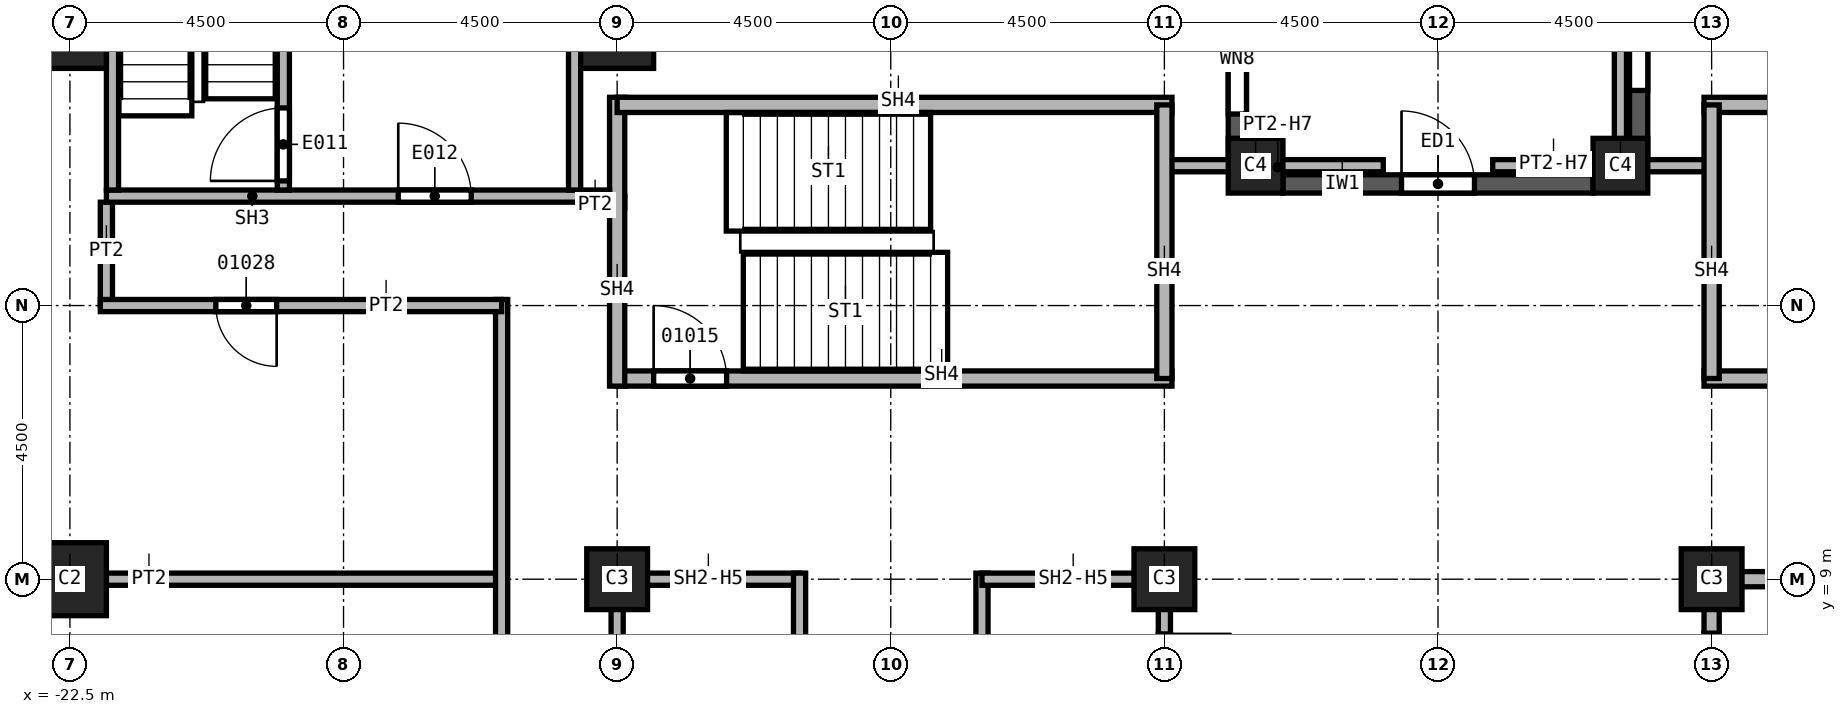
"""IFC4 building model, lengths in metres.
Left out: names, types, materials, properties, quantities, classifications, styles, units other than length and angle.
Written with IfcOpenShell. Run it as: python <this file> out.ifc"""

import sys

from ifc_helpers import new_model, si_unit, direction, frame, frame_2d, origin, origin_2d, place, context, subcontext, project, spatial, rectangle, extrude, element, fill, save


model = new_model("IFC4")
c1 = context("Model", 3, precision=1e-05, world=origin(), true_north=direction((0.0, 1.0)))
c2 = subcontext(c1, "Body", "Model", "MODEL_VIEW")
j1 = project(units=[si_unit("LENGTHUNIT", "METRE"), si_unit("PLANEANGLEUNIT", "RADIAN")], contexts=[c1])
p1 = place(None, origin())
s1 = spatial("IfcSite", under=j1, at=p1, CompositionType="ELEMENT")
p2 = place(p1, origin())
s2 = spatial("IfcBuilding", under=s1, at=p2, CompositionType="ELEMENT")
p3 = place(p2, frame((0.0, 0.0, 68.0)))
s3 = spatial("IfcBuildingStorey", under=s2, at=p3, CompositionType="ELEMENT", Elevation=68.0)
for number, where, z_axis, x_axis in (
    (1, (-13.5, 18.0, 0.0), (0.0, 0.0, 1.0), (1.0, 0.0, 0.0)),
    (2, (-22.5, 9.0, 0.0), (0.0, 0.0, 1.0), (1.0, 0.0, 0.0)),
    (3, (-22.5, 18.0, 0.0), (0.0, 0.0, 1.0), (1.0, 0.0, 0.0)),
):
    element("IfcColumn", number, at=place(p3, frame(where, z_axis=z_axis, x_axis=x_axis)), inside=s3, PredefinedType="COLUMN", context=c2, shape_type="SweptSolid", body=[
        extrude(rectangle(XDim=1.2, YDim=1.2, at=origin_2d()), origin(), (0.0, 0.0, 1.0), 3.7),
    ])
for number, where, z_axis, x_axis in (
    (4, (4.5, 9.0, 0.0), (0.0, 0.0, 1.0), (1.0, 0.0, 0.0)),
    (5, (-4.5, 9.0, 0.0), (0.0, 0.0, 1.0), (1.0, 0.0, 0.0)),
    (6, (-13.5, 9.0, 0.0), (0.0, 0.0, 1.0), (1.0, 0.0, 0.0)),
):
    element("IfcColumn", number, at=place(p3, frame(where, z_axis=z_axis, x_axis=x_axis)), inside=s3, PredefinedType="COLUMN", context=c2, shape_type="SweptSolid", body=[
        extrude(rectangle(XDim=1.0, YDim=1.0, at=origin_2d()), origin(), (0.0, 0.0, 1.0), 3.7),
    ])
for number, where, z_axis, x_axis in (
    (7, (3.0, 15.8, 0.0), (0.0, 0.0, 1.0), (1.0, 0.0, 0.0)),
    (8, (-3.0, 15.8, 0.0), (0.0, 0.0, 1.0), (1.0, 0.0, 0.0)),
):
    element("IfcColumn", number, at=place(p3, frame(where, z_axis=z_axis, x_axis=x_axis)), inside=s3, PredefinedType="COLUMN", context=c2, shape_type="SweptSolid", body=[
        extrude(rectangle(XDim=0.9, YDim=0.9, at=origin_2d()), origin(), (0.0, 0.0, 1.0), 3.7),
    ])
p4 = place(p3, frame((3.3, 24.2, 0.0), z_axis=(0.0, 0.0, 1.0), x_axis=(0.0, -1.0, 0.0)))
e9 = element("IfcWall", 9, at=p4, inside=s3, PredefinedType="SOLIDWALL", context=c2, shape_type="SweptSolid", body=[
    extrude(rectangle(XDim=8.35, YDim=0.3, at=frame_2d((4.175, 0.0))), origin(), (0.0, 0.0, 1.0), 3.1),
])
p5 = place(p4, frame((0.788, 0.0, 0.8)))
e10 = element("IfcOpeningElement", 10, at=p5, cuts=e9, PredefinedType="OPENING", context=c2, shape_type="SweptSolid", body=[
    extrude(rectangle(XDim=2.4, YDim=1.95, at=frame_2d((1.2, 0.975))), frame((0.0, 0.15, 0.0), z_axis=(0.0, -1.0, 0.0), x_axis=(1.0, 0.0, 0.0)), (0.0, 0.0, 1.0), 0.3),
])
p6 = place(p4, frame((4.762, 0.0, 0.8)))
e11 = element("IfcOpeningElement", 11, at=p6, cuts=e9, PredefinedType="OPENING", context=c2, shape_type="SweptSolid", body=[
    extrude(rectangle(XDim=2.4, YDim=1.95, at=frame_2d((1.2, 0.975))), frame((0.0, 0.15, 0.0), z_axis=(0.0, -1.0, 0.0), x_axis=(1.0, 0.0, 0.0)), (0.0, 0.0, 1.0), 0.3),
])
p7 = place(p3, frame((-2.55, 15.5, 0.0), z_axis=(0.0, 0.0, 1.0), x_axis=(1.0, 0.0, 0.0)))
e12 = element("IfcWall", 12, at=p7, inside=s3, PredefinedType="SOLIDWALL", context=c2, shape_type="SweptSolid", body=[
    extrude(rectangle(XDim=5.1, YDim=0.3, at=frame_2d((2.55, 0.0))), origin(), (0.0, 0.0, 1.0), 3.1),
])
p8 = place(p7, frame((1.95, 0.0, 0.0)))
e13 = element("IfcOpeningElement", 13, at=p8, cuts=e12, PredefinedType="OPENING", context=c2, shape_type="SweptSolid", body=[
    extrude(rectangle(XDim=1.2, YDim=2.4, at=frame_2d((0.6, 1.2))), frame((0.0, 0.15, 0.0), z_axis=(0.0, -1.0, 0.0), x_axis=(1.0, 0.0, 0.0)), (0.0, 0.0, 1.0), 0.3),
])
p9 = place(p3, frame((-3.3, 15.85, 0.0), z_axis=(0.0, 0.0, 1.0), x_axis=(0.0, 1.0, 0.0)))
e14 = element("IfcWall", 14, at=p9, inside=s3, PredefinedType="SOLIDWALL", context=c2, shape_type="SweptSolid", body=[
    extrude(rectangle(XDim=8.35, YDim=0.3, at=frame_2d((4.175, 0.0))), origin(), (0.0, 0.0, 1.0), 3.1),
])
p10 = place(p9, frame((4.363, 0.0, 0.8)))
e15 = element("IfcOpeningElement", 15, at=p10, cuts=e14, PredefinedType="OPENING", context=c2, shape_type="SweptSolid", body=[
    extrude(rectangle(XDim=2.4, YDim=1.95, at=frame_2d((1.2, 0.975))), frame((0.0, 0.15, 0.0), z_axis=(0.0, -1.0, 0.0), x_axis=(1.0, 0.0, 0.0)), (0.0, 0.0, 1.0), 0.3),
])
p11 = place(p9, frame((0.8, 0.0, 0.8)))
e16 = element("IfcOpeningElement", 16, at=p11, cuts=e14, PredefinedType="OPENING", context=c2, shape_type="SweptSolid", body=[
    extrude(rectangle(XDim=1.8, YDim=1.95, at=frame_2d((0.9, 0.975))), frame((0.0, 0.15, 0.0), z_axis=(0.0, -1.0, 0.0), x_axis=(1.0, 0.0, 0.0)), (0.0, 0.0, 1.0), 0.3),
])
p12 = place(p3, frame((-27.1, 9.0, 0.0), z_axis=(0.0, 0.0, 1.0), x_axis=(1.0, 0.0, 0.0)))
e17 = element("IfcWall", 17, at=p12, inside=s3, PredefinedType="PARTITIONING", context=c2, shape_type="SweptSolid", body=[
    extrude(rectangle(XDim=11.7, YDim=0.2, at=frame_2d((5.85, 0.0))), origin(), (0.0, 0.0, 1.0), 3.7),
])
p13 = place(p3, frame((-21.9, 13.5, 0.0), z_axis=(0.0, 0.0, 1.0), x_axis=(0.0, 1.0, 0.0)))
e18 = element("IfcWall", 18, at=p13, inside=s3, PredefinedType="PARTITIONING", context=c2, shape_type="SweptSolid", body=[
    extrude(rectangle(XDim=1.7, YDim=0.2, at=frame_2d((0.85, 0.0))), origin(), (0.0, 0.0, 1.0), 3.7),
])
p14 = place(p3, frame((-15.4, 3.65, 0.0), z_axis=(0.0, 0.0, 1.0), x_axis=(0.0, 1.0, 0.0)))
e19 = element("IfcWall", 19, at=p14, inside=s3, PredefinedType="PARTITIONING", context=c2, shape_type="SweptSolid", body=[
    extrude(rectangle(XDim=9.95, YDim=0.2, at=frame_2d((4.975, 0.0))), origin(), (0.0, 0.0, 1.0), 3.7),
])
p15 = place(p3, frame((-15.4, 13.5, 0.0), z_axis=(0.0, 0.0, 1.0), x_axis=(-1.0, 0.0, 0.0)))
e20 = element("IfcWall", 20, at=p15, inside=s3, PredefinedType="PARTITIONING", context=c2, shape_type="SweptSolid", body=[
    extrude(rectangle(XDim=6.6, YDim=0.2, at=frame_2d((3.3, 0.0))), origin(), (0.0, 0.0, 1.0), 3.7),
])
p16 = place(p15, frame((3.7, 0.0, 0.0)))
e21 = element("IfcOpeningElement", 21, at=p16, cuts=e20, PredefinedType="OPENING", context=c2, shape_type="SweptSolid", body=[
    extrude(rectangle(XDim=1.0, YDim=2.1, at=frame_2d((0.5, 1.05))), frame((0.0, 0.1, 0.0), z_axis=(0.0, -1.0, 0.0), x_axis=(1.0, 0.0, 0.0)), (0.0, 0.0, 1.0), 0.2),
])
p17 = place(p3, frame((-14.1, 15.2, 0.0), z_axis=(0.0, 0.0, 1.0), x_axis=(1.0, 0.0, 0.0)))
e22 = element("IfcWall", 22, at=p17, inside=s3, PredefinedType="PARTITIONING", context=c2, shape_type="SweptSolid", body=[
    extrude(rectangle(XDim=0.725, YDim=0.2, at=frame_2d((0.363, 0.0))), origin(), (0.0, 0.0, 1.0), 3.7),
])
for number, where, z_axis, x_axis in (
    (23, (-4.5, 15.8, 0.0), (0.0, 0.0, 1.0), (1.0, 0.0, 0.0)),
    (24, (0.9, 15.8, 0.0), (0.0, 0.0, 1.0), (1.0, 0.0, 0.0)),
):
    element("IfcWall", number, at=place(p3, frame(where, z_axis=z_axis, x_axis=x_axis)), inside=s3, PredefinedType="PARTITIONING", context=c2, shape_type="SweptSolid", body=[
        extrude(rectangle(XDim=3.6, YDim=0.2, at=frame_2d((1.8, 0.0))), origin(), (0.0, 0.0, 1.0), 3.083),
    ])
p18 = place(p3, frame((3.0, 24.2, 0.0), z_axis=(0.0, 0.0, 1.0), x_axis=(0.0, -1.0, 0.0)))
e25 = element("IfcWall", 25, at=p18, inside=s3, PredefinedType="PARTITIONING", context=c2, shape_type="SweptSolid", body=[
    extrude(rectangle(XDim=8.4, YDim=0.2, at=frame_2d((4.2, 0.0))), origin(), (0.0, 0.0, 1.0), 2.854),
])
p19 = place(p3, frame((-13.5, 5.0, 0.0), z_axis=(0.0, 0.0, 1.0), x_axis=(0.0, 1.0, 0.0)))
e26 = element("IfcWall", 26, at=p19, inside=s3, PredefinedType="SOLIDWALL", context=c2, shape_type="SweptSolid", body=[
    extrude(rectangle(XDim=4.1, YDim=0.2, at=frame_2d((2.05, 0.0))), origin(), (0.0, 0.0, 1.0), 2.938),
])
p20 = place(p3, frame((-13.5, 9.0, 0.0), z_axis=(0.0, 0.0, 1.0), x_axis=(1.0, 0.0, 0.0)))
e27 = element("IfcWall", 27, at=p20, inside=s3, PredefinedType="SOLIDWALL", context=c2, shape_type="SweptSolid", body=[
    extrude(rectangle(XDim=3.0, YDim=0.2, at=frame_2d((1.5, 0.0))), origin(), (0.0, 0.0, 1.0), 2.938),
])
p21 = place(p3, frame((-10.5, 4.925, 0.0), z_axis=(0.0, 0.0, 1.0), x_axis=(0.0, 1.0, 0.0)))
e28 = element("IfcWall", 28, at=p21, inside=s3, PredefinedType="SOLIDWALL", context=c2, shape_type="SweptSolid", body=[
    extrude(rectangle(XDim=4.175, YDim=0.2, at=frame_2d((2.087, 0.0))), origin(), (0.0, 0.0, 1.0), 3.7),
])
p22 = place(p21, frame((0.25, 0.0, 0.0)))
e29 = element("IfcOpeningElement", 29, at=p22, cuts=e28, PredefinedType="OPENING", context=c2, shape_type="SweptSolid", body=[
    extrude(rectangle(XDim=1.1, YDim=2.1, at=frame_2d((0.55, 1.05))), frame((0.0, 0.1, 0.0), z_axis=(0.0, -1.0, 0.0), x_axis=(1.0, 0.0, 0.0)), (0.0, 0.0, 1.0), 0.2),
])
p23 = place(p3, frame((-7.5, 2.875, 0.0), z_axis=(0.0, 0.0, 1.0), x_axis=(0.0, 1.0, 0.0)))
e30 = element("IfcWall", 30, at=p23, inside=s3, PredefinedType="SOLIDWALL", context=c2, shape_type="SweptSolid", body=[
    extrude(rectangle(XDim=6.225, YDim=0.2, at=frame_2d((3.113, 0.0))), origin(), (0.0, 0.0, 1.0), 3.7),
])
p24 = place(p3, frame((-7.5, 9.0, 0.0), z_axis=(0.0, 0.0, 1.0), x_axis=(1.0, 0.0, 0.0)))
e31 = element("IfcWall", 31, at=p24, inside=s3, PredefinedType="SOLIDWALL", context=c2, shape_type="SweptSolid", body=[
    extrude(rectangle(XDim=3.0, YDim=0.2, at=frame_2d((1.5, 0.0))), origin(), (0.0, 0.0, 1.0), 2.938),
])
p25 = place(p3, frame((-4.5, 9.1, 0.0), z_axis=(0.0, 0.0, 1.0), x_axis=(0.0, -1.0, 0.0)))
e32 = element("IfcWall", 32, at=p25, inside=s3, PredefinedType="SOLIDWALL", context=c2, shape_type="SweptSolid", body=[
    extrude(rectangle(XDim=9.1, YDim=0.2, at=frame_2d((4.55, 0.0))), origin(), (0.0, 0.0, 1.0), 2.938),
])
p26 = place(p25, frame((6.5, 0.0, 0.0)))
e33 = element("IfcOpeningElement", 33, at=p26, cuts=e32, PredefinedType="OPENING", context=c2, shape_type="SweptSolid", body=[
    extrude(rectangle(XDim=1.1, YDim=2.1, at=frame_2d((0.55, 1.05))), frame((0.0, 0.1, 0.0), z_axis=(0.0, -1.0, 0.0), x_axis=(1.0, 0.0, 0.0)), (0.0, 0.0, 1.0), 0.2),
])
p27 = place(p25, frame((1.0, 0.0, 0.0)))
e34 = element("IfcOpeningElement", 34, at=p27, cuts=e32, PredefinedType="OPENING", context=c2, shape_type="SweptSolid", body=[
    extrude(rectangle(XDim=1.1, YDim=2.1, at=frame_2d((0.55, 1.05))), frame((0.0, 0.1, 0.0), z_axis=(0.0, -1.0, 0.0), x_axis=(1.0, 0.0, 0.0)), (0.0, 0.0, 1.0), 0.2),
])
p28 = place(p3, frame((4.5, 0.0, 0.0), z_axis=(0.0, 0.0, 1.0), x_axis=(0.0, 1.0, 0.0)))
e35 = element("IfcWall", 35, at=p28, inside=s3, PredefinedType="SOLIDWALL", context=c2, shape_type="SweptSolid", body=[
    extrude(rectangle(XDim=9.125, YDim=0.25, at=frame_2d((4.562, 0.0))), origin(), (0.0, 0.0, 1.0), 2.938),
])
p29 = place(p28, frame((0.95, 0.0, 0.0)))
e36 = element("IfcOpeningElement", 36, at=p29, cuts=e35, PredefinedType="OPENING", context=c2, shape_type="SweptSolid", body=[
    extrude(rectangle(XDim=1.1, YDim=2.1, at=frame_2d((0.55, 1.05))), frame((0.0, 0.125, 0.0), z_axis=(0.0, -1.0, 0.0), x_axis=(1.0, 0.0, 0.0)), (0.0, 0.0, 1.0), 0.25),
])
p30 = place(p28, frame((3.95, 0.0, 0.0)))
e37 = element("IfcOpeningElement", 37, at=p30, cuts=e35, PredefinedType="OPENING", context=c2, shape_type="SweptSolid", body=[
    extrude(rectangle(XDim=1.1, YDim=2.1, at=frame_2d((0.55, 1.05))), frame((0.0, 0.125, 0.0), z_axis=(0.0, -1.0, 0.0), x_axis=(1.0, 0.0, 0.0)), (0.0, 0.0, 1.0), 0.25),
])
p31 = place(p28, frame((7.012, 0.0, 0.0)))
e38 = element("IfcOpeningElement", 38, at=p31, cuts=e35, PredefinedType="OPENING", context=c2, shape_type="SweptSolid", body=[
    extrude(rectangle(XDim=1.1, YDim=2.1, at=frame_2d((0.55, 1.05))), frame((0.0, 0.125, 0.0), z_axis=(0.0, -1.0, 0.0), x_axis=(1.0, 0.0, 0.0)), (0.0, 0.0, 1.0), 0.25),
])
p32 = place(p3, frame((4.5, 9.0, 0.0), z_axis=(0.0, 0.0, 1.0), x_axis=(1.0, 0.0, 0.0)))
e39 = element("IfcWall", 39, at=p32, inside=s3, PredefinedType="SOLIDWALL", context=c2, shape_type="SweptSolid", body=[
    extrude(rectangle(XDim=3.0, YDim=0.25, at=frame_2d((1.5, 0.0))), origin(), (0.0, 0.0, 1.0), 2.938),
])
p33 = place(p3, frame((-13.5, 12.3, 0.0), z_axis=(0.0, 0.0, 1.0), x_axis=(1.0, 0.0, 0.0)))
e40 = element("IfcWall", 40, at=p33, inside=s3, PredefinedType="SOLIDWALL", context=c2, shape_type="SweptSolid", body=[
    extrude(rectangle(XDim=9.125, YDim=0.25, at=frame_2d((4.562, 0.0))), origin(), (0.0, 0.0, 1.0), 3.7),
])
p34 = place(p33, frame((0.6, 0.0, 0.0)))
e41 = element("IfcOpeningElement", 41, at=p34, cuts=e40, PredefinedType="OPENING", context=c2, shape_type="SweptSolid", body=[
    extrude(rectangle(XDim=1.2, YDim=2.1, at=frame_2d((0.6, 1.05))), frame((0.0, 0.125, 0.0), z_axis=(0.0, -1.0, 0.0), x_axis=(1.0, 0.0, 0.0)), (0.0, 0.0, 1.0), 0.25),
])
p35 = place(p3, frame((-13.5, 12.175, 0.0), z_axis=(0.0, 0.0, 1.0), x_axis=(0.0, 1.0, 0.0)))
e42 = element("IfcWall", 42, at=p35, inside=s3, PredefinedType="SOLIDWALL", context=c2, shape_type="SweptSolid", body=[
    extrude(rectangle(XDim=4.75, YDim=0.25, at=frame_2d((2.375, 0.0))), origin(), (0.0, 0.0, 1.0), 3.7),
])
p36 = place(p3, frame((-13.5, 16.8, 0.0), z_axis=(0.0, 0.0, 1.0), x_axis=(1.0, 0.0, 0.0)))
e43 = element("IfcWall", 43, at=p36, inside=s3, PredefinedType="SOLIDWALL", context=c2, shape_type="SweptSolid", body=[
    extrude(rectangle(XDim=9.125, YDim=0.25, at=frame_2d((4.562, 0.0))), origin(), (0.0, 0.0, 1.0), 3.7),
])
p37 = place(p3, frame((-4.5, 16.8, 0.0), z_axis=(0.0, 0.0, 1.0), x_axis=(0.0, -1.0, 0.0)))
e44 = element("IfcWall", 44, at=p37, inside=s3, PredefinedType="SOLIDWALL", context=c2, shape_type="SweptSolid", body=[
    extrude(rectangle(XDim=4.5, YDim=0.25, at=frame_2d((2.25, 0.0))), origin(), (0.0, 0.0, 1.0), 3.7),
])
p38 = place(p3, frame((4.375, 12.3, 0.0), z_axis=(0.0, 0.0, 1.0), x_axis=(1.0, 0.0, 0.0)))
e45 = element("IfcWall", 45, at=p38, inside=s3, PredefinedType="SOLIDWALL", context=c2, shape_type="SweptSolid", body=[
    extrude(rectangle(XDim=9.125, YDim=0.25, at=frame_2d((4.562, 0.0))), origin(), (0.0, 0.0, 1.0), 3.7),
])
p39 = place(p38, frame((7.2, 0.0, 0.0)))
e46 = element("IfcOpeningElement", 46, at=p39, cuts=e45, PredefinedType="OPENING", context=c2, shape_type="SweptSolid", body=[
    extrude(rectangle(XDim=1.2, YDim=2.1, at=frame_2d((0.6, 1.05))), frame((0.0, 0.125, 0.0), z_axis=(0.0, -1.0, 0.0), x_axis=(1.0, 0.0, 0.0)), (0.0, 0.0, 1.0), 0.25),
])
p40 = place(p3, frame((4.375, 16.8, 0.0), z_axis=(0.0, 0.0, 1.0), x_axis=(1.0, 0.0, 0.0)))
e47 = element("IfcWall", 47, at=p40, inside=s3, PredefinedType="SOLIDWALL", context=c2, shape_type="SweptSolid", body=[
    extrude(rectangle(XDim=9.125, YDim=0.25, at=frame_2d((4.562, 0.0))), origin(), (0.0, 0.0, 1.0), 3.7),
])
p41 = place(p3, frame((4.5, 12.3, 0.0), z_axis=(0.0, 0.0, 1.0), x_axis=(0.0, 1.0, 0.0)))
e48 = element("IfcWall", 48, at=p41, inside=s3, PredefinedType="SOLIDWALL", context=c2, shape_type="SweptSolid", body=[
    extrude(rectangle(XDim=4.5, YDim=0.25, at=frame_2d((2.25, 0.0))), origin(), (0.0, 0.0, 1.0), 3.7),
])
p42 = place(p3, frame((-21.9, 15.3, 0.0), z_axis=(0.0, 0.0, 1.0), x_axis=(1.0, 0.0, 0.0)))
e49 = element("IfcWall", 49, at=p42, inside=s3, PredefinedType="SOLIDWALL", context=c2, shape_type="SweptSolid", body=[
    extrude(rectangle(XDim=8.275, YDim=0.2, at=frame_2d((4.137, 0.0))), origin(), (0.0, 0.0, 1.0), 3.7),
])
p43 = place(p42, frame((4.8, 0.0, 0.0)))
e50 = element("IfcOpeningElement", 50, at=p43, cuts=e49, PredefinedType="OPENING", context=c2, shape_type="SweptSolid", body=[
    extrude(rectangle(XDim=1.2, YDim=2.1, at=frame_2d((0.6, 1.05))), frame((0.0, 0.1, 0.0), z_axis=(0.0, -1.0, 0.0), x_axis=(1.0, 0.0, 0.0)), (0.0, 0.0, 1.0), 0.2),
])
for number, where, z_axis, x_axis in (
    (51, (-21.8, 15.4, 0.0), (0.0, 0.0, 1.0), (0.0, 1.0, 0.0)),
    (52, (-14.2, 15.4, 0.0), (0.0, 0.0, 1.0), (0.0, 1.0, 0.0)),
):
    element("IfcWall", number, at=place(p3, frame(where, z_axis=z_axis, x_axis=x_axis)), inside=s3, PredefinedType="SOLIDWALL", context=c2, shape_type="SweptSolid", body=[
        extrude(rectangle(XDim=5.9, YDim=0.2, at=frame_2d((2.95, 0.0))), origin(), (0.0, 0.0, 1.0), 3.7),
    ])
p44 = place(p3, frame((-18.99, 15.4, 0.0), z_axis=(0.0, 0.0, 1.0), x_axis=(0.0, 1.0, 0.0)))
e53 = element("IfcWall", 53, at=p44, inside=s3, PredefinedType="SOLIDWALL", context=c2, shape_type="SweptSolid", body=[
    extrude(rectangle(XDim=5.9, YDim=0.2, at=frame_2d((2.95, 0.0))), origin(), (0.0, 0.0, 1.0), 3.7),
])
p45 = place(p44, frame((0.15, 0.0, 0.0)))
e54 = element("IfcOpeningElement", 54, at=p45, cuts=e53, PredefinedType="OPENING", context=c2, shape_type="SweptSolid", body=[
    extrude(rectangle(XDim=1.2, YDim=2.1, at=frame_2d((0.6, 1.05))), frame((0.0, 0.1, 0.0), z_axis=(0.0, -1.0, 0.0), x_axis=(1.0, 0.0, 0.0)), (0.0, 0.0, 1.0), 0.2),
])
p46 = place(p6, origin())
e55 = element("IfcWindow", 55, at=p46, inside=s3, PartitioningType="SINGLE_PANEL", PredefinedType="WINDOW", context=c2, shape_type="SweptSolid", body=[
    extrude(rectangle(XDim=2.4, YDim=1.95, at=frame_2d((1.2, 0.975))), frame((0.0, 0.03, 0.0), z_axis=(0.0, -1.0, 0.0), x_axis=(1.0, 0.0, 0.0)), (0.0, 0.0, 1.0), 0.06),
])
fill(e11, e55)
p47 = place(p8, origin())
e56 = element("IfcDoor", 56, at=p47, inside=s3, OperationType="SINGLE_SWING_LEFT", PredefinedType="DOOR", context=c2, shape_type="SweptSolid", body=[
    extrude(rectangle(XDim=1.2, YDim=2.4, at=frame_2d((0.6, 1.2))), frame((0.0, 0.025, 0.0), z_axis=(0.0, -1.0, 0.0), x_axis=(1.0, 0.0, 0.0)), (0.0, 0.0, 1.0), 0.05),
])
fill(e13, e56)
p48 = place(p34, origin())
e57 = element("IfcDoor", 57, at=p48, inside=s3, OperationType="SINGLE_SWING_RIGHT", PredefinedType="DOOR", context=c2, shape_type="SweptSolid", body=[
    extrude(rectangle(XDim=1.2, YDim=2.1, at=frame_2d((0.6, 1.05))), frame((0.0, 0.025, 0.0), z_axis=(0.0, -1.0, 0.0), x_axis=(1.0, 0.0, 0.0)), (0.0, 0.0, 1.0), 0.05),
])
fill(e41, e57)
p49 = place(p16, origin())
e58 = element("IfcDoor", 58, at=p49, inside=s3, OperationType="SINGLE_SWING_LEFT", PredefinedType="DOOR", context=c2, shape_type="SweptSolid", body=[
    extrude(rectangle(XDim=1.0, YDim=2.1, at=frame_2d((0.5, 1.05))), frame((0.0, 0.025, 0.0), z_axis=(0.0, -1.0, 0.0), x_axis=(1.0, 0.0, 0.0)), (0.0, 0.0, 1.0), 0.05),
])
fill(e21, e58)
p50 = place(p31, origin())
e59 = element("IfcDoor", 59, at=p50, inside=s3, OperationType="SLIDING_TO_LEFT", PredefinedType="DOOR", context=c2, shape_type="SweptSolid", body=[
    extrude(rectangle(XDim=1.1, YDim=2.1, at=frame_2d((0.55, 1.05))), frame((0.0, 0.025, 0.0), z_axis=(0.0, -1.0, 0.0), x_axis=(1.0, 0.0, 0.0)), (0.0, 0.0, 1.0), 0.05),
])
fill(e38, e59)
p51 = place(p45, origin())
e60 = element("IfcDoor", 60, at=p51, inside=s3, OperationType="SINGLE_SWING_LEFT", PredefinedType="DOOR", context=c2, shape_type="SweptSolid", body=[
    extrude(rectangle(XDim=1.2, YDim=2.1, at=frame_2d((0.6, 1.05))), frame((0.0, 0.025, 0.0), z_axis=(0.0, -1.0, 0.0), x_axis=(1.0, 0.0, 0.0)), (0.0, 0.0, 1.0), 0.05),
])
fill(e54, e60)
p52 = place(p43, origin())
e61 = element("IfcDoor", 61, at=p52, inside=s3, OperationType="SINGLE_SWING_RIGHT", PredefinedType="DOOR", context=c2, shape_type="SweptSolid", body=[
    extrude(rectangle(XDim=1.2, YDim=2.1, at=frame_2d((0.6, 1.05))), frame((0.0, 0.025, 0.0), z_axis=(0.0, -1.0, 0.0), x_axis=(1.0, 0.0, 0.0)), (0.0, 0.0, 1.0), 0.05),
])
fill(e50, e61)
p53 = place(p11, origin())
e62 = element("IfcWindow", 62, at=p53, inside=s3, PartitioningType="SINGLE_PANEL", PredefinedType="WINDOW", context=c2, shape_type="SweptSolid", body=[
    extrude(rectangle(XDim=1.8, YDim=1.95, at=frame_2d((0.9, 0.975))), frame((0.0, 0.03, 0.0), z_axis=(0.0, -1.0, 0.0), x_axis=(1.0, 0.0, 0.0)), (0.0, 0.0, 1.0), 0.06),
])
fill(e16, e62)
save(model, sys.argv[1])
